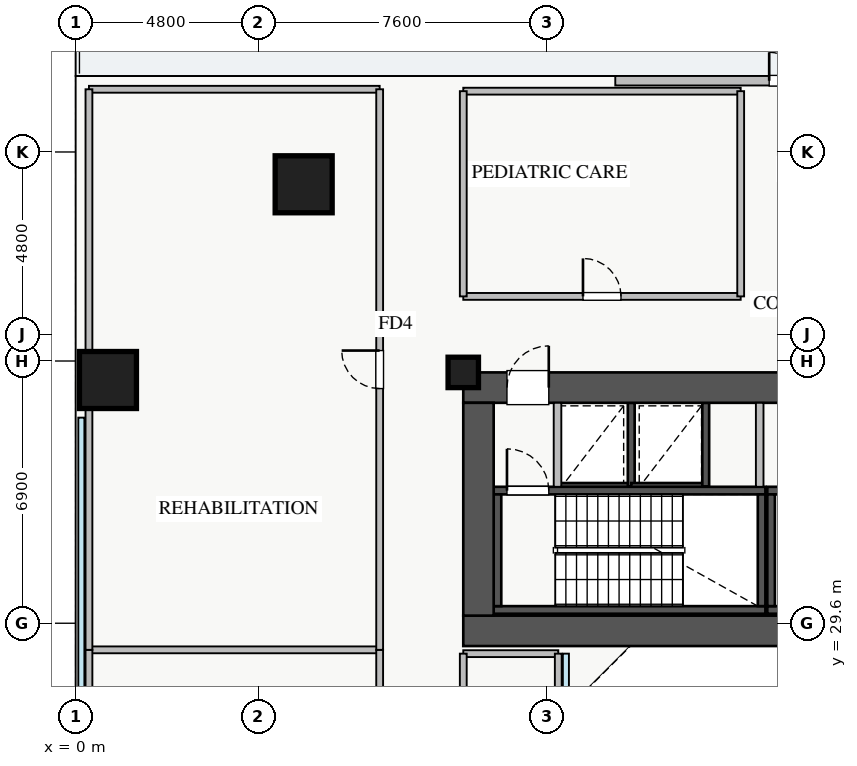
"""IFC4 building model, lengths in metres.
Left out: names, types, materials, properties, quantities, classifications, styles, units other than length and angle.
Written with IfcOpenShell. Run it as: python <this file> out.ifc"""

import sys

from ifc_helpers import new_model, si_unit, direction, frame, frame_2d, origin, origin_2d, place, context, subcontext, project, spatial, rectangle, extrude, source, transform, mapped, element, fill, save


model = new_model("IFC4")
c1 = context("Model", 3, precision=1e-05, world=origin(), true_north=direction((0.0, 1.0)))
c2 = subcontext(c1, "Body", "Model", "MODEL_VIEW")
j1 = project(units=[si_unit("LENGTHUNIT", "METRE"), si_unit("PLANEANGLEUNIT", "RADIAN")], contexts=[c1])
p1 = place(None, origin())
s1 = spatial("IfcSite", under=j1, at=p1, CompositionType="ELEMENT")
p2 = place(p1, origin())
s2 = spatial("IfcBuilding", under=s1, at=p2, CompositionType="ELEMENT")
p3 = place(p2, frame((0.0, 0.0, 5.0)))
s3 = spatial("IfcBuildingStorey", under=s2, at=p3, CompositionType="ELEMENT", Elevation=5.0)
p4 = place(p3, frame((12.68, 33.2, 0.0), z_axis=(0.0, 0.0, 1.0), x_axis=(1.0, 0.0, 0.0)))
e1 = element("IfcWall", 1, at=p4, inside=s3, PredefinedType="SHEAR", context=c2, shape_type="SweptSolid", body=[
    extrude(rectangle(XDim=1.94, YDim=0.18, at=frame_2d((0.97, 0.0))), origin(), (0.0, 0.0, 1.0), 4.18),
])
p5 = place(p3, frame((14.62, 33.2, 0.0), z_axis=(0.0, 0.0, 1.0), x_axis=(0.0, 1.0, 0.0)))
e2 = element("IfcWall", 2, at=p5, inside=s3, PredefinedType="SHEAR", context=c2, shape_type="SweptSolid", body=[
    extrude(rectangle(XDim=2.2, YDim=0.18, at=frame_2d((1.1, 0.0))), origin(), (0.0, 0.0, 1.0), 4.18),
])
p6 = place(p3, frame((14.62, 33.2, 0.0), z_axis=(0.0, 0.0, 1.0), x_axis=(1.0, 0.0, 0.0)))
e3 = element("IfcWall", 3, at=p6, inside=s3, PredefinedType="SHEAR", context=c2, shape_type="SweptSolid", body=[
    extrude(rectangle(XDim=1.96, YDim=0.18, at=frame_2d((0.98, 0.0))), origin(), (0.0, 0.0, 1.0), 4.18),
])
p7 = place(p3, frame((16.58, 33.2, 0.0), z_axis=(0.0, 0.0, 1.0), x_axis=(0.0, 1.0, 0.0)))
e4 = element("IfcWall", 4, at=p7, inside=s3, PredefinedType="SHEAR", context=c2, shape_type="SweptSolid", body=[
    extrude(rectangle(XDim=2.2, YDim=0.18, at=frame_2d((1.1, 0.0))), origin(), (0.0, 0.0, 1.0), 4.18),
])
p8 = place(p3, frame((11.0, 29.95, 0.0), z_axis=(0.0, 0.0, 1.0), x_axis=(1.0, 0.0, 0.0)))
e5 = element("IfcWall", 5, at=p8, inside=s3, PredefinedType="SHEAR", context=c2, shape_type="SweptSolid", body=[
    extrude(rectangle(XDim=7.15, YDim=0.2, at=frame_2d((3.575, 0.0))), origin(), (0.0, 0.0, 1.0), 4.4),
])
p9 = place(p3, frame((11.0, 33.09, 0.0), z_axis=(0.0, 0.0, 1.0), x_axis=(1.0, 0.0, 0.0)))
e6 = element("IfcWall", 6, at=p9, inside=s3, PredefinedType="SHEAR", context=c2, shape_type="SweptSolid", body=[
    extrude(rectangle(XDim=7.15, YDim=0.2, at=frame_2d((3.575, 0.0))), origin(), (0.0, 0.0, 1.0), 4.4),
])
p10 = place(p9, frame((0.35, 0.0, 0.0)))
e7 = element("IfcOpeningElement", 7, at=p10, cuts=e6, PredefinedType="OPENING", context=c2, shape_type="SweptSolid", body=[
    extrude(rectangle(XDim=1.1, YDim=2.05, at=frame_2d((0.55, 1.025))), frame((0.0, 0.11, 0.0), z_axis=(0.0, -1.0, 0.0), x_axis=(1.0, 0.0, 0.0)), (0.0, 0.0, 1.0), 0.22),
])
for number, where, z_axis, x_axis in (
    (8, (11.1, 30.05, 0.0), (0.0, 0.0, 1.0), (0.0, 1.0, 0.0)),
    (9, (18.05, 30.05, 0.0), (0.0, 0.0, 1.0), (0.0, 1.0, 0.0)),
):
    element("IfcWall", number, at=place(p3, frame(where, z_axis=z_axis, x_axis=x_axis)), inside=s3, PredefinedType="SHEAR", context=c2, shape_type="SweptSolid", body=[
        extrude(rectangle(XDim=2.94, YDim=0.2, at=frame_2d((1.47, 0.0))), origin(), (0.0, 0.0, 1.0), 4.4),
    ])
p11 = place(p3, frame((18.2, 29.95, 0.0), z_axis=(0.0, 0.0, 1.0), x_axis=(1.0, 0.0, 0.0)))
e10 = element("IfcWall", 10, at=p11, inside=s3, PredefinedType="SHEAR", context=c2, shape_type="SweptSolid", body=[
    extrude(rectangle(XDim=7.15, YDim=0.2, at=frame_2d((3.575, 0.0))), origin(), (0.0, 0.0, 1.0), 4.4),
])
p12 = place(p3, frame((18.2, 33.09, 0.0), z_axis=(0.0, 0.0, 1.0), x_axis=(1.0, 0.0, 0.0)))
e11 = element("IfcWall", 11, at=p12, inside=s3, PredefinedType="SHEAR", context=c2, shape_type="SweptSolid", body=[
    extrude(rectangle(XDim=7.15, YDim=0.2, at=frame_2d((3.575, 0.0))), origin(), (0.0, 0.0, 1.0), 4.4),
])
p13 = place(p12, frame((0.35, 0.0, 0.0)))
e12 = element("IfcOpeningElement", 12, at=p13, cuts=e11, PredefinedType="OPENING", context=c2, shape_type="SweptSolid", body=[
    extrude(rectangle(XDim=1.1, YDim=2.05, at=frame_2d((0.55, 1.025))), frame((0.0, 0.11, 0.0), z_axis=(0.0, -1.0, 0.0), x_axis=(1.0, 0.0, 0.0)), (0.0, 0.0, 1.0), 0.22),
])
p14 = place(p3, frame((18.3, 30.05, 0.0), z_axis=(0.0, 0.0, 1.0), x_axis=(0.0, 1.0, 0.0)))
e13 = element("IfcWall", 13, at=p14, inside=s3, PredefinedType="SHEAR", context=c2, shape_type="SweptSolid", body=[
    extrude(rectangle(XDim=2.94, YDim=0.2, at=frame_2d((1.47, 0.0))), origin(), (0.0, 0.0, 1.0), 4.4),
])
p15 = place(p3, frame((10.2, 29.4, 0.0), z_axis=(0.0, 0.0, 1.0), x_axis=(1.0, 0.0, 0.0)))
e14 = element("IfcWall", 14, at=p15, inside=s3, PredefinedType="SHEAR", context=c2, shape_type="SweptSolid", body=[
    extrude(rectangle(XDim=17.6, YDim=0.8, at=frame_2d((8.8, 0.0))), origin(), (0.0, 0.0, 1.0), 4.4),
])
p16 = place(p3, frame((10.2, 35.8, 0.0), z_axis=(0.0, 0.0, 1.0), x_axis=(1.0, 0.0, 0.0)))
e15 = element("IfcWall", 15, at=p16, inside=s3, PredefinedType="SHEAR", context=c2, shape_type="SweptSolid", body=[
    extrude(rectangle(XDim=17.6, YDim=0.8, at=frame_2d((8.8, 0.0))), origin(), (0.0, 0.0, 1.0), 4.4),
])
p17 = place(p16, frame((1.15, 0.0, 0.0)))
e16 = element("IfcOpeningElement", 16, at=p17, cuts=e15, PredefinedType="OPENING", context=c2, shape_type="SweptSolid", body=[
    extrude(rectangle(XDim=1.1, YDim=2.05, at=frame_2d((0.55, 1.025))), frame((0.0, 0.41, 0.0), z_axis=(0.0, -1.0, 0.0), x_axis=(1.0, 0.0, 0.0)), (0.0, 0.0, 1.0), 0.82),
])
p18 = place(p16, frame((8.3, 0.0, 0.0)))
e17 = element("IfcOpeningElement", 17, at=p18, cuts=e15, PredefinedType="OPENING", context=c2, shape_type="SweptSolid", body=[
    extrude(rectangle(XDim=1.1, YDim=2.05, at=frame_2d((0.55, 1.025))), frame((0.0, 0.41, 0.0), z_axis=(0.0, -1.0, 0.0), x_axis=(1.0, 0.0, 0.0)), (0.0, 0.0, 1.0), 0.82),
])
p19 = place(p16, frame((10.05, 0.0, 0.0)))
e18 = element("IfcOpeningElement", 18, at=p19, cuts=e15, PredefinedType="OPENING", context=c2, shape_type="SweptSolid", body=[
    extrude(rectangle(XDim=1.1, YDim=2.05, at=frame_2d((0.55, 1.025))), frame((0.0, 0.41, 0.0), z_axis=(0.0, -1.0, 0.0), x_axis=(1.0, 0.0, 0.0)), (0.0, 0.0, 1.0), 0.82),
])
p20 = place(p16, frame((14.74, 0.0, 0.0)))
e19 = element("IfcOpeningElement", 19, at=p20, cuts=e15, PredefinedType="OPENING", context=c2, shape_type="SweptSolid", body=[
    extrude(rectangle(XDim=1.0, YDim=2.05, at=frame_2d((0.5, 1.025))), frame((0.0, 0.41, 0.0), z_axis=(0.0, -1.0, 0.0), x_axis=(1.0, 0.0, 0.0)), (0.0, 0.0, 1.0), 0.82),
])
p21 = place(p16, frame((11.835, 0.0, 0.0)))
e20 = element("IfcOpeningElement", 20, at=p21, cuts=e15, PredefinedType="OPENING", context=c2, shape_type="SweptSolid", body=[
    extrude(rectangle(XDim=1.0, YDim=2.05, at=frame_2d((0.5, 1.025))), frame((0.0, 0.41, 0.0), z_axis=(0.0, -1.0, 0.0), x_axis=(1.0, 0.0, 0.0)), (0.0, 0.0, 1.0), 0.82),
])
p22 = place(p16, frame((13.37, 0.0, 0.0)))
e21 = element("IfcOpeningElement", 21, at=p22, cuts=e15, PredefinedType="OPENING", context=c2, shape_type="SweptSolid", body=[
    extrude(rectangle(XDim=1.0, YDim=2.05, at=frame_2d((0.5, 1.025))), frame((0.0, 0.41, 0.0), z_axis=(0.0, -1.0, 0.0), x_axis=(1.0, 0.0, 0.0)), (0.0, 0.0, 1.0), 0.82),
])
p23 = place(p3, frame((10.6, 29.8, 0.0), z_axis=(0.0, 0.0, 1.0), x_axis=(0.0, 1.0, 0.0)))
e22 = element("IfcWall", 22, at=p23, inside=s3, PredefinedType="SHEAR", context=c2, shape_type="SweptSolid", body=[
    extrude(rectangle(XDim=5.6, YDim=0.8, at=frame_2d((2.8, 0.0))), origin(), (0.0, 0.0, 1.0), 4.4),
])
m1 = source(origin(), c2, "Body", "SweptSolid", [
    extrude(rectangle(XDim=1.5, YDim=1.5, at=origin_2d()), origin(), (0.0, 0.0, 1.0), 4.4),
])
for number, where, z_axis, x_axis in (
    (23, (6.0, 41.15, 0.0), (0.0, 0.0, 1.0), (1.0, 0.0, 0.0)),
    (24, (0.85, 36.0, 0.0), (0.0, 0.0, 1.0), (1.0, 0.0, 0.0)),
):
    element("IfcColumn", number, at=place(p3, frame(where, z_axis=z_axis, x_axis=x_axis)), inside=s3, PredefinedType="COLUMN", context=c2, shape_type="MappedRepresentation", body=[
        mapped(m1, transform((0.0, 0.0, 0.0), x_axis=(1.0, 0.0, 0.0), y_axis=(0.0, 1.0, 0.0), z_axis=(0.0, 0.0, 1.0), scale=1.0)),
    ])
m2 = source(origin(), c2, "Body", "SweptSolid", [
    extrude(rectangle(XDim=0.8, YDim=0.8, at=origin_2d()), origin(), (0.0, 0.0, 1.0), 4.4),
])
p24 = place(p3, frame((10.2, 36.2, 0.0), z_axis=(0.0, 0.0, 1.0), x_axis=(1.0, 0.0, 0.0)))
e25 = element("IfcColumn", 25, at=p24, inside=s3, PredefinedType="PILASTER", context=c2, shape_type="MappedRepresentation", body=[
    mapped(m2, transform((0.0, 0.0, 0.0), x_axis=(1.0, 0.0, 0.0), y_axis=(0.0, 1.0, 0.0), z_axis=(0.0, 0.0, 1.0), scale=1.0)),
])
p25 = place(p3, frame((14.2, 43.875, 0.0), z_axis=(0.0, 0.0, 1.0), x_axis=(1.0, 0.0, 0.0)))
e26 = element("IfcWall", 26, at=p25, inside=s3, PredefinedType="STANDARD", context=c2, shape_type="SweptSolid", body=[
    extrude(rectangle(XDim=9.6, YDim=0.25, at=frame_2d((4.8, 0.0))), origin(), (0.0, 0.0, 1.0), 3.72),
])
p26 = place(p25, frame((4.05, 0.0, 0.0)))
e27 = element("IfcOpeningElement", 27, at=p26, cuts=e26, PredefinedType="OPENING", context=c2, shape_type="SweptSolid", body=[
    extrude(rectangle(XDim=1.5, YDim=2.15, at=frame_2d((0.75, 1.075))), frame((0.0, 0.135, 0.0), z_axis=(0.0, -1.0, 0.0), x_axis=(1.0, 0.0, 0.0)), (0.0, 0.0, 1.0), 0.27),
])
for number, where, z_axis, x_axis in (
    (28, (12.68, 33.19, 0.0), (0.0, 0.0, 1.0), (0.0, 1.0, 0.0)),
    (29, (18.0, 33.19, 0.0), (0.0, 0.0, 1.0), (0.0, 1.0, 0.0)),
):
    element("IfcWall", number, at=place(p3, frame(where, z_axis=z_axis, x_axis=x_axis)), inside=s3, PredefinedType="PARTITIONING", context=c2, shape_type="SweptSolid", body=[
        extrude(rectangle(XDim=2.21, YDim=0.2, at=frame_2d((1.105, 0.0))), origin(), (0.0, 0.0, 1.0), 4.18),
    ])
p27 = place(p3, frame((0.35, 28.9, 0.0), z_axis=(0.0, 0.0, 1.0), x_axis=(1.0, 0.0, 0.0)))
e30 = element("IfcWall", 30, at=p27, inside=s3, PredefinedType="PARTITIONING", context=c2, shape_type="SweptSolid", body=[
    extrude(rectangle(XDim=7.65, YDim=0.18, at=frame_2d((3.825, 0.0))), origin(), (0.0, 0.0, 1.0), 4.18),
])
p28 = place(p3, frame((0.35, 16.3, 0.0), z_axis=(0.0, 0.0, 1.0), x_axis=(0.0, 1.0, 0.0)))
e31 = element("IfcWall", 31, at=p28, inside=s3, PredefinedType="PARTITIONING", context=c2, shape_type="SweptSolid", body=[
    extrude(rectangle(XDim=12.6, YDim=0.18, at=frame_2d((6.3, 0.0))), origin(), (0.0, 0.0, 1.0), 4.18),
])
p29 = place(p3, frame((8.0, 16.3, 0.0), z_axis=(0.0, 0.0, 1.0), x_axis=(0.0, 1.0, 0.0)))
e32 = element("IfcWall", 32, at=p29, inside=s3, PredefinedType="PARTITIONING", context=c2, shape_type="SweptSolid", body=[
    extrude(rectangle(XDim=12.6, YDim=0.18, at=frame_2d((6.3, 0.0))), origin(), (0.0, 0.0, 1.0), 4.18),
])
p30 = place(p29, frame((5.8, 0.0, 0.0)))
e33 = element("IfcOpeningElement", 33, at=p30, cuts=e32, PredefinedType="OPENING", context=c2, shape_type="SweptSolid", body=[
    extrude(rectangle(XDim=1.0, YDim=2.05, at=frame_2d((0.5, 1.025))), frame((0.0, 0.1, 0.0), z_axis=(0.0, -1.0, 0.0), x_axis=(1.0, 0.0, 0.0)), (0.0, 0.0, 1.0), 0.2),
])
p31 = place(p3, frame((0.35, 43.65, 0.0), z_axis=(0.0, 0.0, 1.0), x_axis=(1.0, 0.0, 0.0)))
e34 = element("IfcWall", 34, at=p31, inside=s3, PredefinedType="PARTITIONING", context=c2, shape_type="SweptSolid", body=[
    extrude(rectangle(XDim=7.65, YDim=0.18, at=frame_2d((3.825, 0.0))), origin(), (0.0, 0.0, 1.0), 4.18),
])
p32 = place(p3, frame((0.35, 28.9, 0.0), z_axis=(0.0, 0.0, 1.0), x_axis=(0.0, 1.0, 0.0)))
e35 = element("IfcWall", 35, at=p32, inside=s3, PredefinedType="PARTITIONING", context=c2, shape_type="SweptSolid", body=[
    extrude(rectangle(XDim=14.75, YDim=0.18, at=frame_2d((7.375, 0.0))), origin(), (0.0, 0.0, 1.0), 4.18),
])
p33 = place(p3, frame((8.0, 28.9, 0.0), z_axis=(0.0, 0.0, 1.0), x_axis=(0.0, 1.0, 0.0)))
e36 = element("IfcWall", 36, at=p33, inside=s3, PredefinedType="PARTITIONING", context=c2, shape_type="SweptSolid", body=[
    extrude(rectangle(XDim=14.75, YDim=0.18, at=frame_2d((7.375, 0.0))), origin(), (0.0, 0.0, 1.0), 4.18),
])
p34 = place(p33, frame((6.875, 0.0, 0.0)))
e37 = element("IfcOpeningElement", 37, at=p34, cuts=e36, PredefinedType="OPENING", context=c2, shape_type="SweptSolid", body=[
    extrude(rectangle(XDim=1.0, YDim=2.05, at=frame_2d((0.5, 1.025))), frame((0.0, 0.1, 0.0), z_axis=(0.0, -1.0, 0.0), x_axis=(1.0, 0.0, 0.0)), (0.0, 0.0, 1.0), 0.2),
])
p35 = place(p3, frame((10.2, 28.8, 0.0), z_axis=(0.0, 0.0, 1.0), x_axis=(1.0, 0.0, 0.0)))
e38 = element("IfcWall", 38, at=p35, inside=s3, PredefinedType="PARTITIONING", context=c2, shape_type="SweptSolid", body=[
    extrude(rectangle(XDim=2.5, YDim=0.18, at=frame_2d((1.25, 0.0))), origin(), (0.0, 0.0, 1.0), 4.18),
])
p36 = place(p3, frame((10.2, 17.2, 0.0), z_axis=(0.0, 0.0, 1.0), x_axis=(0.0, 1.0, 0.0)))
e39 = element("IfcWall", 39, at=p36, inside=s3, PredefinedType="PARTITIONING", context=c2, shape_type="SweptSolid", body=[
    extrude(rectangle(XDim=11.6, YDim=0.18, at=frame_2d((5.8, 0.0))), origin(), (0.0, 0.0, 1.0), 4.18),
])
p37 = place(p36, frame((5.3, 0.0, 0.0)))
e40 = element("IfcOpeningElement", 40, at=p37, cuts=e39, PredefinedType="OPENING", context=c2, shape_type="SweptSolid", body=[
    extrude(rectangle(XDim=1.0, YDim=2.05, at=frame_2d((0.5, 1.025))), frame((0.0, 0.1, 0.0), z_axis=(0.0, -1.0, 0.0), x_axis=(1.0, 0.0, 0.0)), (0.0, 0.0, 1.0), 0.2),
])
p38 = place(p3, frame((12.7, 17.2, 0.0), z_axis=(0.0, 0.0, 1.0), x_axis=(0.0, 1.0, 0.0)))
e41 = element("IfcWall", 41, at=p38, inside=s3, PredefinedType="PARTITIONING", context=c2, shape_type="SweptSolid", body=[
    extrude(rectangle(XDim=11.6, YDim=0.18, at=frame_2d((5.8, 0.0))), origin(), (0.0, 0.0, 1.0), 4.18),
])
p39 = place(p3, frame((10.2, 38.2, 0.0), z_axis=(0.0, 0.0, 1.0), x_axis=(1.0, 0.0, 0.0)))
e42 = element("IfcWall", 42, at=p39, inside=s3, PredefinedType="PARTITIONING", context=c2, shape_type="SweptSolid", body=[
    extrude(rectangle(XDim=7.3, YDim=0.18, at=frame_2d((3.65, 0.0))), origin(), (0.0, 0.0, 1.0), 4.18),
])
p40 = place(p39, frame((3.15, 0.0, 0.0)))
e43 = element("IfcOpeningElement", 43, at=p40, cuts=e42, PredefinedType="OPENING", context=c2, shape_type="SweptSolid", body=[
    extrude(rectangle(XDim=1.0, YDim=2.05, at=frame_2d((0.5, 1.025))), frame((0.0, 0.1, 0.0), z_axis=(0.0, -1.0, 0.0), x_axis=(1.0, 0.0, 0.0)), (0.0, 0.0, 1.0), 0.2),
])
p41 = place(p3, frame((10.2, 43.6, 0.0), z_axis=(0.0, 0.0, 1.0), x_axis=(1.0, 0.0, 0.0)))
e44 = element("IfcWall", 44, at=p41, inside=s3, PredefinedType="PARTITIONING", context=c2, shape_type="SweptSolid", body=[
    extrude(rectangle(XDim=7.3, YDim=0.18, at=frame_2d((3.65, 0.0))), origin(), (0.0, 0.0, 1.0), 4.18),
])
for number, where, z_axis, x_axis in (
    (45, (10.2, 38.2, 0.0), (0.0, 0.0, 1.0), (0.0, 1.0, 0.0)),
    (46, (17.5, 38.2, 0.0), (0.0, 0.0, 1.0), (0.0, 1.0, 0.0)),
):
    element("IfcWall", number, at=place(p3, frame(where, z_axis=z_axis, x_axis=x_axis)), inside=s3, PredefinedType="PARTITIONING", context=c2, shape_type="SweptSolid", body=[
        extrude(rectangle(XDim=5.4, YDim=0.18, at=frame_2d((2.7, 0.0))), origin(), (0.0, 0.0, 1.0), 4.18),
    ])
m3 = source(origin(), c2, "Body", "SweptSolid", [
    extrude(rectangle(XDim=1.5, YDim=2.15, at=frame_2d((0.75, 1.075))), frame((0.0, 0.025, 0.0), z_axis=(0.0, -1.0, 0.0), x_axis=(1.0, 0.0, 0.0)), (0.0, 0.0, 1.0), 0.05),
])
p42 = place(p26, origin())
e47 = element("IfcDoor", 47, at=p42, inside=s3, OperationType="DOUBLE_DOOR_SINGLE_SWING", PredefinedType="DOOR", context=c2, shape_type="MappedRepresentation", body=[
    mapped(m3, transform((0.0, 0.0, 0.0), x_axis=(1.0, 0.0, 0.0), y_axis=(0.0, 1.0, 0.0), z_axis=(0.0, 0.0, 1.0), scale=1.0)),
])
fill(e27, e47)
m4 = source(origin(), c2, "Body", "SweptSolid", [
    extrude(rectangle(XDim=1.1, YDim=2.05, at=frame_2d((0.55, 1.025))), frame((0.0, 0.025, 0.0), z_axis=(0.0, -1.0, 0.0), x_axis=(1.0, 0.0, 0.0)), (0.0, 0.0, 1.0), 0.05),
])
p43 = place(p17, origin())
e48 = element("IfcDoor", 48, at=p43, inside=s3, OperationType="SINGLE_SWING_RIGHT", PredefinedType="DOOR", context=c2, shape_type="MappedRepresentation", body=[
    mapped(m4, transform((0.0, 0.0, 0.0), x_axis=(1.0, 0.0, 0.0), y_axis=(0.0, 1.0, 0.0), z_axis=(0.0, 0.0, 1.0), scale=1.0)),
])
fill(e16, e48)
p44 = place(p10, origin())
e49 = element("IfcDoor", 49, at=p44, inside=s3, OperationType="SINGLE_SWING_LEFT", PredefinedType="DOOR", context=c2, shape_type="MappedRepresentation", body=[
    mapped(m4, transform((0.0, 0.0, 0.0), x_axis=(1.0, 0.0, 0.0), y_axis=(0.0, 1.0, 0.0), z_axis=(0.0, 0.0, 1.0), scale=1.0)),
])
fill(e7, e49)
m5 = source(origin(), c2, "Body", "SweptSolid", [
    extrude(rectangle(XDim=1.0, YDim=2.05, at=frame_2d((0.5, 1.025))), frame((0.0, 0.025, 0.0), z_axis=(0.0, -1.0, 0.0), x_axis=(1.0, 0.0, 0.0)), (0.0, 0.0, 1.0), 0.05),
])
p45 = place(p34, origin())
e50 = element("IfcDoor", 50, at=p45, inside=s3, OperationType="SINGLE_SWING_RIGHT", PredefinedType="DOOR", context=c2, shape_type="MappedRepresentation", body=[
    mapped(m5, transform((0.0, 0.0, 0.0), x_axis=(1.0, 0.0, 0.0), y_axis=(0.0, 1.0, 0.0), z_axis=(0.0, 0.0, 1.0), scale=1.0)),
])
fill(e37, e50)
p46 = place(p40, origin())
e51 = element("IfcDoor", 51, at=p46, inside=s3, OperationType="SINGLE_SWING_LEFT", PredefinedType="DOOR", context=c2, shape_type="MappedRepresentation", body=[
    mapped(m5, transform((0.0, 0.0, 0.0), x_axis=(1.0, 0.0, 0.0), y_axis=(0.0, 1.0, 0.0), z_axis=(0.0, 0.0, 1.0), scale=1.0)),
])
fill(e43, e51)
save(model, sys.argv[1])
